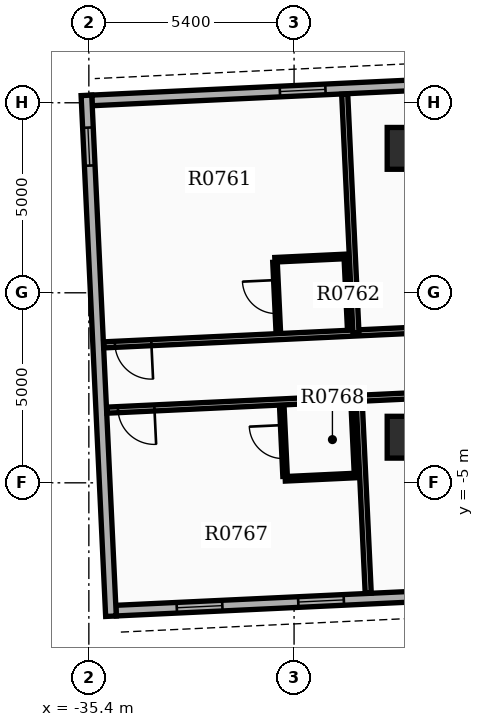
"""IFC4 building model, lengths in metres.
Left out: names, types, materials, properties, quantities, classifications, styles, units other than length and angle.
Written with IfcOpenShell. Run it as: python <this file> out.ifc"""

import sys

from ifc_helpers import new_model, si_unit, direction, frame, frame_2d, origin, origin_2d, place, context, subcontext, project, spatial, rectangle, extrude, element, fill, save


model = new_model("IFC4")
c1 = context("Model", 3, precision=1e-05, world=origin(), true_north=direction((0.0, 1.0)))
c2 = subcontext(c1, "Body", "Model", "MODEL_VIEW")
j1 = project(units=[si_unit("LENGTHUNIT", "METRE"), si_unit("PLANEANGLEUNIT", "RADIAN")], contexts=[c1])
p1 = place(None, origin())
s1 = spatial("IfcSite", under=j1, at=p1, CompositionType="ELEMENT")
p2 = place(p1, origin())
s2 = spatial("IfcBuilding", under=s1, at=p2, CompositionType="ELEMENT")
p3 = place(p2, frame((0.0, 0.0, 52.2)))
s3 = spatial("IfcBuildingStorey", under=s2, at=p3, CompositionType="ELEMENT", Elevation=52.2)
for number, where, z_axis, x_axis in (
    (1, (-27.0, -3.8, 0.0), (0.0, 0.0, 1.0), (1.0, 0.0, 0.0)),
    (2, (-27.0, 3.8, 0.0), (0.0, 0.0, 1.0), (1.0, 0.0, 0.0)),
):
    element("IfcColumn", number, at=place(p3, frame(where, z_axis=z_axis, x_axis=x_axis)), inside=s3, PredefinedType="COLUMN", context=c2, shape_type="SweptSolid", body=[
        extrude(rectangle(XDim=1.1, YDim=1.1, at=origin_2d()), origin(), (0.0, 0.0, 1.0), 3.9),
    ])
p4 = place(p3, frame((-15.24, 6.009, 0.0), z_axis=(0.0, 0.0, 1.0), x_axis=(-0.998890015344, -0.047103473814, 0.0)))
e3 = element("IfcWall", 3, at=p4, inside=s3, PredefinedType="STANDARD", context=c2, shape_type="SweptSolid", body=[
    extrude(rectangle(XDim=20.1, YDim=0.28, at=frame_2d((10.05, 0.0))), origin(), (0.0, 0.0, 1.0), 2.91),
])
p5 = place(p4, frame((1.6, 0.0, 0.8)))
e4 = element("IfcOpeningElement", 4, at=p5, cuts=e3, PredefinedType="OPENING", context=c2, shape_type="SweptSolid", body=[
    extrude(rectangle(XDim=1.2, YDim=1.6, at=frame_2d((0.6, 0.8))), frame((0.0, 0.15, 0.0), z_axis=(0.0, -1.0, 0.0), x_axis=(1.0, 0.0, 0.0)), (0.0, 0.0, 1.0), 0.3),
])
p6 = place(p4, frame((7.05, 0.0, 0.8)))
e5 = element("IfcOpeningElement", 5, at=p6, cuts=e3, PredefinedType="OPENING", context=c2, shape_type="SweptSolid", body=[
    extrude(rectangle(XDim=1.2, YDim=1.6, at=frame_2d((0.6, 0.8))), frame((0.0, 0.15, 0.0), z_axis=(0.0, -1.0, 0.0), x_axis=(1.0, 0.0, 0.0)), (0.0, 0.0, 1.0), 0.3),
])
p7 = place(p4, frame((10.25, 0.0, 0.8)))
e6 = element("IfcOpeningElement", 6, at=p7, cuts=e3, PredefinedType="OPENING", context=c2, shape_type="SweptSolid", body=[
    extrude(rectangle(XDim=1.2, YDim=1.6, at=frame_2d((0.6, 0.8))), frame((0.0, 0.15, 0.0), z_axis=(0.0, -1.0, 0.0), x_axis=(1.0, 0.0, 0.0)), (0.0, 0.0, 1.0), 0.3),
])
p8 = place(p4, frame((13.95, 0.0, 0.8)))
e7 = element("IfcOpeningElement", 7, at=p8, cuts=e3, PredefinedType="OPENING", context=c2, shape_type="SweptSolid", body=[
    extrude(rectangle(XDim=1.2, YDim=1.6, at=frame_2d((0.6, 0.8))), frame((0.0, 0.15, 0.0), z_axis=(0.0, -1.0, 0.0), x_axis=(1.0, 0.0, 0.0)), (0.0, 0.0, 1.0), 0.3),
])
p9 = place(p3, frame((-34.685, -8.363, 0.0), z_axis=(0.0, 0.0, 1.0), x_axis=(0.998890015344, 0.047103473814, 0.0)))
e8 = element("IfcWall", 8, at=p9, inside=s3, PredefinedType="STANDARD", context=c2, shape_type="SweptSolid", body=[
    extrude(rectangle(XDim=20.1, YDim=0.28, at=frame_2d((10.05, 0.0))), origin(), (0.0, 0.0, 1.0), 2.91),
])
p10 = place(p9, frame((1.6, 0.0, 0.8)))
e9 = element("IfcOpeningElement", 9, at=p10, cuts=e8, PredefinedType="OPENING", context=c2, shape_type="SweptSolid", body=[
    extrude(rectangle(XDim=1.2, YDim=1.6, at=frame_2d((0.6, 0.8))), frame((0.0, 0.15, 0.0), z_axis=(0.0, -1.0, 0.0), x_axis=(1.0, 0.0, 0.0)), (0.0, 0.0, 1.0), 0.3),
])
p11 = place(p9, frame((4.8, 0.0, 0.8)))
e10 = element("IfcOpeningElement", 10, at=p11, cuts=e8, PredefinedType="OPENING", context=c2, shape_type="SweptSolid", body=[
    extrude(rectangle(XDim=1.2, YDim=1.6, at=frame_2d((0.6, 0.8))), frame((0.0, 0.15, 0.0), z_axis=(0.0, -1.0, 0.0), x_axis=(1.0, 0.0, 0.0)), (0.0, 0.0, 1.0), 0.3),
])
p12 = place(p9, frame((8.0, 0.0, 0.8)))
e11 = element("IfcOpeningElement", 11, at=p12, cuts=e8, PredefinedType="OPENING", context=c2, shape_type="SweptSolid", body=[
    extrude(rectangle(XDim=1.2, YDim=1.6, at=frame_2d((0.6, 0.8))), frame((0.0, 0.15, 0.0), z_axis=(0.0, -1.0, 0.0), x_axis=(1.0, 0.0, 0.0)), (0.0, 0.0, 1.0), 0.3),
])
p13 = place(p9, frame((11.2, 0.0, 0.8)))
e12 = element("IfcOpeningElement", 12, at=p13, cuts=e8, PredefinedType="OPENING", context=c2, shape_type="SweptSolid", body=[
    extrude(rectangle(XDim=1.2, YDim=1.6, at=frame_2d((0.6, 0.8))), frame((0.0, 0.15, 0.0), z_axis=(0.0, -1.0, 0.0), x_axis=(1.0, 0.0, 0.0)), (0.0, 0.0, 1.0), 0.3),
])
p14 = place(p9, frame((15.0, 0.0, 0.0)))
e13 = element("IfcOpeningElement", 13, at=p14, cuts=e8, PredefinedType="OPENING", context=c2, shape_type="SweptSolid", body=[
    extrude(rectangle(XDim=0.96, YDim=2.1, at=frame_2d((0.48, 1.05))), frame((0.0, 0.15, 0.0), z_axis=(0.0, -1.0, 0.0), x_axis=(1.0, 0.0, 0.0)), (0.0, 0.0, 1.0), 0.3),
])
p15 = place(p3, frame((-35.464, 5.195, 0.0), z_axis=(0.0, 0.0, 1.0), x_axis=(0.047101845086, -0.998890092147, 0.0)))
e14 = element("IfcWall", 14, at=p15, inside=s3, PredefinedType="STANDARD", context=c2, shape_type="SweptSolid", body=[
    extrude(rectangle(XDim=13.72, YDim=0.28, at=frame_2d((6.86, 0.0))), origin(), (0.0, 0.0, 1.0), 2.91),
])
p16 = place(p15, frame((0.85, 0.0, 0.85)))
e15 = element("IfcOpeningElement", 15, at=p16, cuts=e14, PredefinedType="OPENING", context=c2, shape_type="SweptSolid", body=[
    extrude(rectangle(XDim=1.0, YDim=1.5, at=frame_2d((0.5, 0.75))), frame((0.0, 0.15, 0.0), z_axis=(0.0, -1.0, 0.0), x_axis=(1.0, 0.0, 0.0)), (0.0, 0.0, 1.0), 0.3),
])
p17 = place(p3, frame((-14.847, -0.42, 0.0), z_axis=(0.0, 0.0, 1.0), x_axis=(-0.998889926753, -0.047105352469, 0.0)))
e16 = element("IfcWall", 16, at=p17, inside=s3, PredefinedType="PARTITIONING", context=c2, shape_type="SweptSolid", body=[
    extrude(rectangle(XDim=20.182, YDim=0.16, at=frame_2d((10.091, 0.0))), origin(), (0.0, 0.0, 1.0), 2.9),
])
p18 = place(p17, frame((2.626, 0.0, 0.0)))
e17 = element("IfcOpeningElement", 17, at=p18, cuts=e16, PredefinedType="OPENING", context=c2, shape_type="SweptSolid", body=[
    extrude(rectangle(XDim=0.96, YDim=2.15, at=frame_2d((0.48, 1.075))), frame((0.0, 0.09, 0.0), z_axis=(0.0, -1.0, 0.0), x_axis=(1.0, 0.0, 0.0)), (0.0, 0.0, 1.0), 0.18),
])
p19 = place(p17, frame((9.143, 0.0, 0.0)))
e18 = element("IfcOpeningElement", 18, at=p19, cuts=e16, PredefinedType="OPENING", context=c2, shape_type="SweptSolid", body=[
    extrude(rectangle(XDim=0.96, YDim=2.15, at=frame_2d((0.48, 1.075))), frame((0.0, 0.09, 0.0), z_axis=(0.0, -1.0, 0.0), x_axis=(1.0, 0.0, 0.0)), (0.0, 0.0, 1.0), 0.18),
])
p20 = place(p17, frame((18.93, 0.0, 0.0)))
e19 = element("IfcOpeningElement", 19, at=p20, cuts=e16, PredefinedType="OPENING", context=c2, shape_type="SweptSolid", body=[
    extrude(rectangle(XDim=0.96, YDim=2.15, at=frame_2d((0.48, 1.075))), frame((0.0, 0.09, 0.0), z_axis=(0.0, -1.0, 0.0), x_axis=(1.0, 0.0, 0.0)), (0.0, 0.0, 1.0), 0.18),
])
p21 = place(p3, frame((-28.372, -1.058, 0.0), z_axis=(0.0, 0.0, 1.0), x_axis=(-0.047106099844, 0.998889891508, 0.0)))
e20 = element("IfcWall", 20, at=p21, inside=s3, PredefinedType="PARTITIONING", context=c2, shape_type="SweptSolid", body=[
    extrude(rectangle(XDim=6.292, YDim=0.16, at=frame_2d((3.146, 0.0))), origin(), (0.0, 0.0, 1.0), 2.9),
])
p22 = place(p3, frame((-30.416, -1.014, 0.0), z_axis=(0.0, 0.0, 1.0), x_axis=(-0.047080807099, 0.998891083954, 0.0)))
e21 = element("IfcWall", 21, at=p22, inside=s3, PredefinedType="PARTITIONING", context=c2, shape_type="SweptSolid", body=[
    extrude(rectangle(XDim=1.82, YDim=0.12, at=frame_2d((0.91, 0.0))), origin(), (0.0, 0.0, 1.0), 2.9),
])
p23 = place(p22, frame((0.47, 0.0, 0.0)))
e22 = element("IfcOpeningElement", 22, at=p23, cuts=e21, PredefinedType="OPENING", context=c2, shape_type="SweptSolid", body=[
    extrude(rectangle(XDim=0.88, YDim=2.1, at=frame_2d((0.44, 1.05))), frame((0.0, 0.07, 0.0), z_axis=(0.0, -1.0, 0.0), x_axis=(1.0, 0.0, 0.0)), (0.0, 0.0, 1.0), 0.14),
])
p24 = place(p3, frame((-28.538, -0.925, 0.0), z_axis=(0.0, 0.0, 1.0), x_axis=(-0.047087116047, 0.998890786574, 0.0)))
e23 = element("IfcWall", 23, at=p24, inside=s3, PredefinedType="PARTITIONING", context=c2, shape_type="SweptSolid", body=[
    extrude(rectangle(XDim=1.82, YDim=0.12, at=frame_2d((0.91, 0.0))), origin(), (0.0, 0.0, 1.0), 2.9),
])
p25 = place(p3, frame((-28.627, 0.958, 0.0), z_axis=(0.0, 0.0, 1.0), x_axis=(-0.998888319371, -0.047139425368, 0.0)))
e24 = element("IfcWall", 24, at=p25, inside=s3, PredefinedType="PARTITIONING", context=c2, shape_type="SweptSolid", body=[
    extrude(rectangle(XDim=1.88, YDim=0.12, at=frame_2d((0.94, 0.0))), origin(), (0.0, 0.0, 1.0), 2.9),
])
p26 = place(p3, frame((-14.766, -2.138, 0.0), z_axis=(0.0, 0.0, 1.0), x_axis=(-0.998889926753, -0.047105352469, 0.0)))
e25 = element("IfcWall", 25, at=p26, inside=s3, PredefinedType="PARTITIONING", context=c2, shape_type="SweptSolid", body=[
    extrude(rectangle(XDim=20.182, YDim=0.16, at=frame_2d((10.091, 0.0))), origin(), (0.0, 0.0, 1.0), 2.9),
])
p27 = place(p26, frame((2.626, 0.0, 0.0)))
e26 = element("IfcOpeningElement", 26, at=p27, cuts=e25, PredefinedType="OPENING", context=c2, shape_type="SweptSolid", body=[
    extrude(rectangle(XDim=0.96, YDim=2.15, at=frame_2d((0.48, 1.075))), frame((0.0, 0.09, 0.0), z_axis=(0.0, -1.0, 0.0), x_axis=(1.0, 0.0, 0.0)), (0.0, 0.0, 1.0), 0.18),
])
p28 = place(p26, frame((9.143, 0.0, 0.0)))
e27 = element("IfcOpeningElement", 27, at=p28, cuts=e25, PredefinedType="OPENING", context=c2, shape_type="SweptSolid", body=[
    extrude(rectangle(XDim=0.96, YDim=2.15, at=frame_2d((0.48, 1.075))), frame((0.0, 0.09, 0.0), z_axis=(0.0, -1.0, 0.0), x_axis=(1.0, 0.0, 0.0)), (0.0, 0.0, 1.0), 0.18),
])
p29 = place(p26, frame((18.93, 0.0, 0.0)))
e28 = element("IfcOpeningElement", 28, at=p29, cuts=e25, PredefinedType="OPENING", context=c2, shape_type="SweptSolid", body=[
    extrude(rectangle(XDim=0.96, YDim=2.15, at=frame_2d((0.48, 1.075))), frame((0.0, 0.09, 0.0), z_axis=(0.0, -1.0, 0.0), x_axis=(1.0, 0.0, 0.0)), (0.0, 0.0, 1.0), 0.18),
])
p30 = place(p3, frame((-28.291, -2.776, 0.0), z_axis=(0.0, 0.0, 1.0), x_axis=(0.047144738582, -0.998888068616, 0.0)))
e29 = element("IfcWall", 29, at=p30, inside=s3, PredefinedType="PARTITIONING", context=c2, shape_type="SweptSolid", body=[
    extrude(rectangle(XDim=5.132, YDim=0.16, at=frame_2d((2.566, 0.0))), origin(), (0.0, 0.0, 1.0), 2.9),
])
p31 = place(p3, frame((-30.236, -4.83, 0.0), z_axis=(0.0, 0.0, 1.0), x_axis=(-0.047087116047, 0.998890786574, 0.0)))
e30 = element("IfcWall", 30, at=p31, inside=s3, PredefinedType="PARTITIONING", context=c2, shape_type="SweptSolid", body=[
    extrude(rectangle(XDim=1.82, YDim=0.12, at=frame_2d((0.91, 0.0))), origin(), (0.0, 0.0, 1.0), 2.9),
])
p32 = place(p31, frame((0.47, 0.0, 0.0)))
e31 = element("IfcOpeningElement", 31, at=p32, cuts=e30, PredefinedType="OPENING", context=c2, shape_type="SweptSolid", body=[
    extrude(rectangle(XDim=0.88, YDim=2.1, at=frame_2d((0.44, 1.05))), frame((0.0, 0.07, 0.0), z_axis=(0.0, -1.0, 0.0), x_axis=(1.0, 0.0, 0.0)), (0.0, 0.0, 1.0), 0.14),
])
p33 = place(p3, frame((-28.358, -4.741, 0.0), z_axis=(0.0, 0.0, 1.0), x_axis=(-0.047080807099, 0.998891083954, 0.0)))
e32 = element("IfcWall", 32, at=p33, inside=s3, PredefinedType="PARTITIONING", context=c2, shape_type="SweptSolid", body=[
    extrude(rectangle(XDim=1.82, YDim=0.12, at=frame_2d((0.91, 0.0))), origin(), (0.0, 0.0, 1.0), 2.9),
])
p34 = place(p3, frame((-28.355, -4.806, 0.0), z_axis=(0.0, 0.0, 1.0), x_axis=(-0.998888319371, -0.047139425368, 0.0)))
e33 = element("IfcWall", 33, at=p34, inside=s3, PredefinedType="PARTITIONING", context=c2, shape_type="SweptSolid", body=[
    extrude(rectangle(XDim=1.88, YDim=0.12, at=frame_2d((0.94, 0.0))), origin(), (0.0, 0.0, 1.0), 2.9),
])
p35 = place(p8, origin())
e34 = element("IfcWindow", 34, at=p35, inside=s3, PartitioningType="SINGLE_PANEL", PredefinedType="WINDOW", context=c2, shape_type="SweptSolid", body=[
    extrude(rectangle(XDim=1.2, YDim=1.6, at=frame_2d((0.6, 0.8))), frame((0.0, 0.03, 0.0), z_axis=(0.0, -1.0, 0.0), x_axis=(1.0, 0.0, 0.0)), (0.0, 0.0, 1.0), 0.06),
])
fill(e7, e34)
p36 = place(p10, origin())
e35 = element("IfcWindow", 35, at=p36, inside=s3, PartitioningType="SINGLE_PANEL", PredefinedType="WINDOW", context=c2, shape_type="SweptSolid", body=[
    extrude(rectangle(XDim=1.2, YDim=1.6, at=frame_2d((0.6, 0.8))), frame((0.0, 0.03, 0.0), z_axis=(0.0, -1.0, 0.0), x_axis=(1.0, 0.0, 0.0)), (0.0, 0.0, 1.0), 0.06),
])
fill(e9, e35)
p37 = place(p11, origin())
e36 = element("IfcWindow", 36, at=p37, inside=s3, PartitioningType="SINGLE_PANEL", PredefinedType="WINDOW", context=c2, shape_type="SweptSolid", body=[
    extrude(rectangle(XDim=1.2, YDim=1.6, at=frame_2d((0.6, 0.8))), frame((0.0, 0.03, 0.0), z_axis=(0.0, -1.0, 0.0), x_axis=(1.0, 0.0, 0.0)), (0.0, 0.0, 1.0), 0.06),
])
fill(e10, e36)
p38 = place(p16, origin())
e37 = element("IfcWindow", 37, at=p38, inside=s3, PartitioningType="SINGLE_PANEL", PredefinedType="WINDOW", context=c2, shape_type="SweptSolid", body=[
    extrude(rectangle(XDim=1.0, YDim=1.5, at=frame_2d((0.5, 0.75))), frame((0.0, 0.03, 0.0), z_axis=(0.0, -1.0, 0.0), x_axis=(1.0, 0.0, 0.0)), (0.0, 0.0, 1.0), 0.06),
])
fill(e15, e37)
p39 = place(p20, origin())
e38 = element("IfcDoor", 38, at=p39, inside=s3, OperationType="SINGLE_SWING_LEFT", PredefinedType="DOOR", context=c2, shape_type="SweptSolid", body=[
    extrude(rectangle(XDim=0.96, YDim=2.15, at=frame_2d((0.48, 1.075))), frame((0.0, 0.025, 0.0), z_axis=(0.0, -1.0, 0.0), x_axis=(1.0, 0.0, 0.0)), (0.0, 0.0, 1.0), 0.05),
])
fill(e19, e38)
p40 = place(p23, origin())
e39 = element("IfcDoor", 39, at=p40, inside=s3, OperationType="SINGLE_SWING_RIGHT", PredefinedType="DOOR", context=c2, shape_type="SweptSolid", body=[
    extrude(rectangle(XDim=0.88, YDim=2.1, at=frame_2d((0.44, 1.05))), frame((0.0, 0.025, 0.0), z_axis=(0.0, -1.0, 0.0), x_axis=(1.0, 0.0, 0.0)), (0.0, 0.0, 1.0), 0.05),
])
fill(e22, e39)
p41 = place(p29, origin())
e40 = element("IfcDoor", 40, at=p41, inside=s3, OperationType="SINGLE_SWING_LEFT", PredefinedType="DOOR", context=c2, shape_type="SweptSolid", body=[
    extrude(rectangle(XDim=0.96, YDim=2.15, at=frame_2d((0.48, 1.075))), frame((0.0, 0.025, 0.0), z_axis=(0.0, -1.0, 0.0), x_axis=(1.0, 0.0, 0.0)), (0.0, 0.0, 1.0), 0.05),
])
fill(e28, e40)
p42 = place(p32, origin())
e41 = element("IfcDoor", 41, at=p42, inside=s3, OperationType="SINGLE_SWING_RIGHT", PredefinedType="DOOR", context=c2, shape_type="SweptSolid", body=[
    extrude(rectangle(XDim=0.88, YDim=2.1, at=frame_2d((0.44, 1.05))), frame((0.0, 0.025, 0.0), z_axis=(0.0, -1.0, 0.0), x_axis=(1.0, 0.0, 0.0)), (0.0, 0.0, 1.0), 0.05),
])
fill(e31, e41)
save(model, sys.argv[1])
